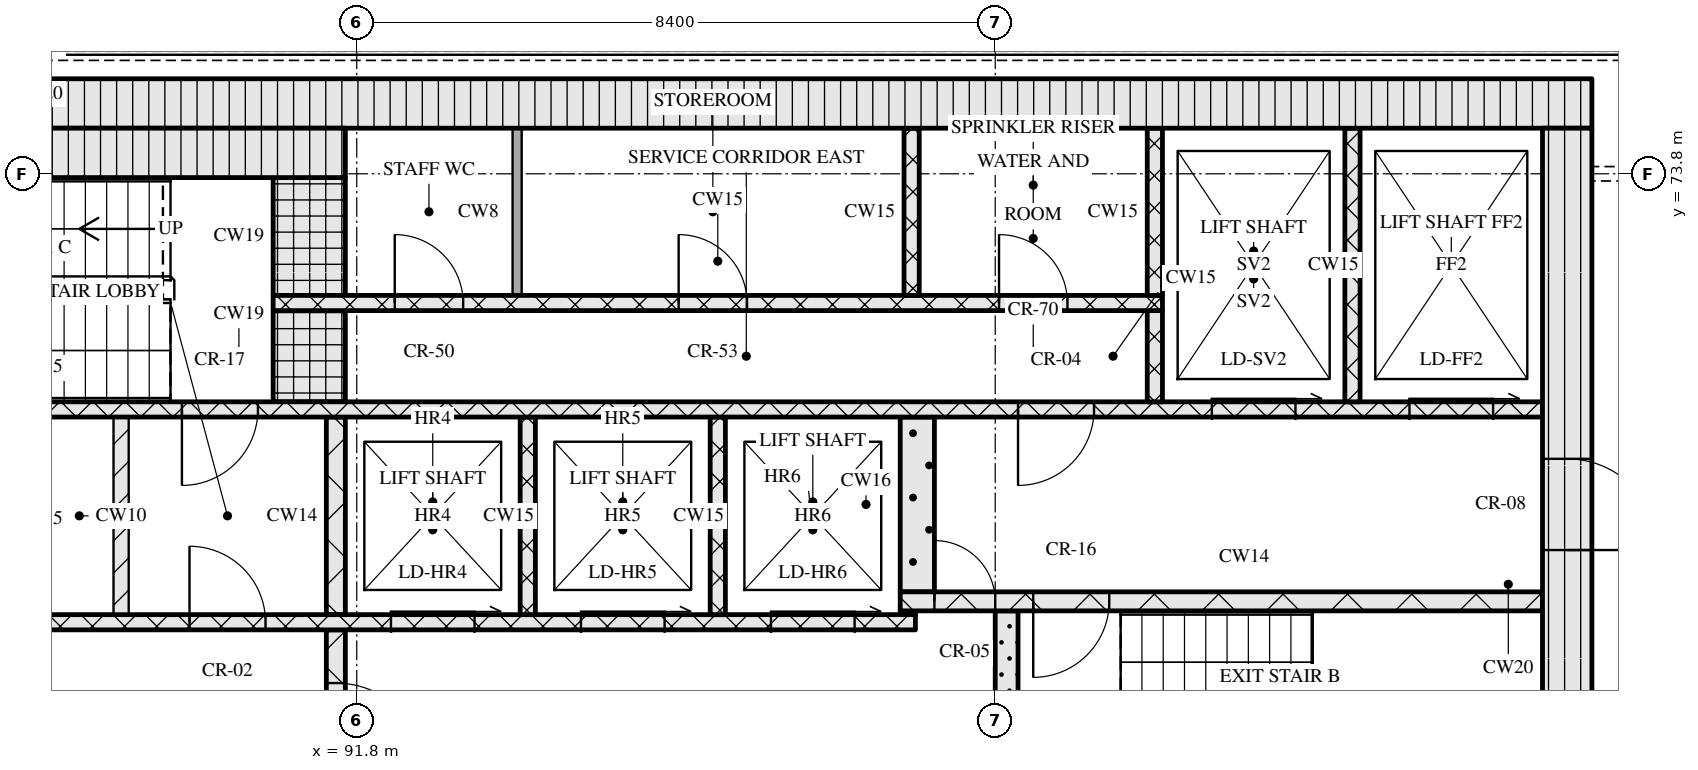
"""IFC4 building model, lengths in metres.
Left out: names, types, materials, properties, quantities, classifications, styles, units other than length and angle.
Written with IfcOpenShell. Run it as: python <this file> out.ifc"""

import sys

from ifc_helpers import new_model, si_unit, direction, frame, frame_2d, origin, place, context, subcontext, project, spatial, rectangle, extrude, element, fill, save


model = new_model("IFC4")
c1 = context("Model", 3, precision=1e-05, world=origin(), true_north=direction((0.0, 1.0)))
c2 = subcontext(c1, "Body", "Model", "MODEL_VIEW")
j1 = project(units=[si_unit("LENGTHUNIT", "METRE"), si_unit("PLANEANGLEUNIT", "RADIAN")], contexts=[c1])
p1 = place(None, origin())
s1 = spatial("IfcSite", under=j1, at=p1, CompositionType="ELEMENT")
p2 = place(p1, origin())
s2 = spatial("IfcBuilding", under=s1, at=p2, CompositionType="ELEMENT")
p3 = place(p2, frame((0.0, 0.0, 219.9)))
s3 = spatial("IfcBuildingStorey", under=s2, at=p3, CompositionType="ELEMENT", Elevation=219.9)
p4 = place(p3, frame((67.15, 74.725, 0.0), z_axis=(0.0, 0.0, 1.0), x_axis=(1.0, 0.0, 0.0)))
e1 = element("IfcWall", 1, at=p4, inside=s3, PredefinedType="SOLIDWALL", context=c2, shape_type="SweptSolid", body=[
    extrude(rectangle(XDim=40.9, YDim=0.65, at=frame_2d((20.45, 0.0))), origin(), (0.0, 0.0, 1.0), 3.32),
])
p5 = place(p3, frame((107.725, 62.4, 0.0), z_axis=(0.0, 0.0, 1.0), x_axis=(0.0, 1.0, 0.0)))
e2 = element("IfcWall", 2, at=p5, inside=s3, PredefinedType="SOLIDWALL", context=c2, shape_type="SweptSolid", body=[
    extrude(rectangle(XDim=12.0, YDim=0.65, at=frame_2d((6.0, 0.0))), origin(), (0.0, 0.0, 1.0), 3.32),
])
p6 = place(p5, frame((6.45, 0.0, 0.0)))
e3 = element("IfcOpeningElement", 3, at=p6, cuts=e2, PredefinedType="OPENING", context=c2, shape_type="SweptSolid", body=[
    extrude(rectangle(XDim=1.2, YDim=2.1, at=frame_2d((0.6, 1.05))), frame((0.0, 0.335, 0.0), z_axis=(0.0, -1.0, 0.0), x_axis=(1.0, 0.0, 0.0)), (0.0, 0.0, 1.0), 0.67),
])
p7 = place(p3, frame((91.525, 65.2, 0.0), z_axis=(0.0, 0.0, 1.0), x_axis=(0.0, 1.0, 0.0)))
e4 = element("IfcWall", 4, at=p7, inside=s3, PredefinedType="SOLIDWALL", context=c2, shape_type="SweptSolid", body=[
    extrude(rectangle(XDim=2.6, YDim=0.25, at=frame_2d((1.3, 0.0))), origin(), (0.0, 0.0, 1.0), 3.32),
])
p8 = place(p7, frame((0.7, 0.0, 0.0)))
e5 = element("IfcOpeningElement", 5, at=p8, cuts=e4, PredefinedType="OPENING", context=c2, shape_type="SweptSolid", body=[
    extrude(rectangle(XDim=1.2, YDim=2.1, at=frame_2d((0.6, 1.05))), frame((0.0, 0.135, 0.0), z_axis=(0.0, -1.0, 0.0), x_axis=(1.0, 0.0, 0.0)), (0.0, 0.0, 1.0), 0.27),
])
p9 = place(p3, frame((100.35, 65.2, 0.0), z_axis=(0.0, 0.0, 1.0), x_axis=(0.0, 1.0, 0.0)))
e6 = element("IfcWall", 6, at=p9, inside=s3, PredefinedType="SOLIDWALL", context=c2, shape_type="SweptSolid", body=[
    extrude(rectangle(XDim=2.85, YDim=0.3, at=frame_2d((1.425, 0.0))), origin(), (0.0, 0.0, 1.0), 3.32),
])
p10 = place(p3, frame((76.05, 67.9, 0.0), z_axis=(0.0, 0.0, 1.0), x_axis=(1.0, 0.0, 0.0)))
e7 = element("IfcWall", 7, at=p10, inside=s3, PredefinedType="SOLIDWALL", context=c2, shape_type="SweptSolid", body=[
    extrude(rectangle(XDim=23.1, YDim=0.2, at=frame_2d((11.55, 0.0))), origin(), (0.0, 0.0, 1.0), 3.32),
])
p11 = place(p10, frame((3.2, 0.0, 0.0)))
e8 = element("IfcOpeningElement", 8, at=p11, cuts=e7, PredefinedType="OPENING", context=c2, shape_type="SweptSolid", body=[
    extrude(rectangle(XDim=0.9, YDim=2.1, at=frame_2d((0.45, 1.05))), frame((0.0, 0.11, 0.0), z_axis=(0.0, -1.0, 0.0), x_axis=(1.0, 0.0, 0.0)), (0.0, 0.0, 1.0), 0.22),
])
p12 = place(p10, frame((9.7, 0.0, 0.0)))
e9 = element("IfcOpeningElement", 9, at=p12, cuts=e7, PredefinedType="OPENING", context=c2, shape_type="SweptSolid", body=[
    extrude(rectangle(XDim=0.9, YDim=2.1, at=frame_2d((0.45, 1.05))), frame((0.0, 0.11, 0.0), z_axis=(0.0, -1.0, 0.0), x_axis=(1.0, 0.0, 0.0)), (0.0, 0.0, 1.0), 0.22),
])
p13 = place(p10, frame((13.55, 0.0, 0.0)))
e10 = element("IfcOpeningElement", 10, at=p13, cuts=e7, PredefinedType="OPENING", context=c2, shape_type="SweptSolid", body=[
    extrude(rectangle(XDim=1.0, YDim=2.1, at=frame_2d((0.5, 1.05))), frame((0.0, 0.11, 0.0), z_axis=(0.0, -1.0, 0.0), x_axis=(1.0, 0.0, 0.0)), (0.0, 0.0, 1.0), 0.22),
])
p14 = place(p10, frame((16.2, 0.0, 0.0)))
e11 = element("IfcOpeningElement", 11, at=p14, cuts=e7, PredefinedType="OPENING", context=c2, shape_type="SweptSolid", body=[
    extrude(rectangle(XDim=1.1, YDim=2.1, at=frame_2d((0.55, 1.05))), frame((0.0, 0.11, 0.0), z_axis=(0.0, -1.0, 0.0), x_axis=(1.0, 0.0, 0.0)), (0.0, 0.0, 1.0), 0.22),
])
p15 = place(p10, frame((18.7, 0.0, 0.0)))
e12 = element("IfcOpeningElement", 12, at=p15, cuts=e7, PredefinedType="OPENING", context=c2, shape_type="SweptSolid", body=[
    extrude(rectangle(XDim=1.1, YDim=2.1, at=frame_2d((0.55, 1.05))), frame((0.0, 0.11, 0.0), z_axis=(0.0, -1.0, 0.0), x_axis=(1.0, 0.0, 0.0)), (0.0, 0.0, 1.0), 0.22),
])
p16 = place(p10, frame((21.2, 0.0, 0.0)))
e13 = element("IfcOpeningElement", 13, at=p16, cuts=e7, PredefinedType="OPENING", context=c2, shape_type="SweptSolid", body=[
    extrude(rectangle(XDim=1.1, YDim=2.1, at=frame_2d((0.55, 1.05))), frame((0.0, 0.11, 0.0), z_axis=(0.0, -1.0, 0.0), x_axis=(1.0, 0.0, 0.0)), (0.0, 0.0, 1.0), 0.22),
])
p17 = place(p3, frame((88.7, 68.0, 0.0), z_axis=(0.0, 0.0, 1.0), x_axis=(0.0, 1.0, 0.0)))
e14 = element("IfcWall", 14, at=p17, inside=s3, PredefinedType="PARTITIONING", context=c2, shape_type="SweptSolid", body=[
    extrude(rectangle(XDim=2.6, YDim=0.2, at=frame_2d((1.3, 0.0))), origin(), (0.0, 0.0, 1.0), 3.32),
])
p18 = place(p3, frame((91.525, 68.0, 0.0), z_axis=(0.0, 0.0, 1.0), x_axis=(0.0, 1.0, 0.0)))
e15 = element("IfcWall", 15, at=p18, inside=s3, PredefinedType="SOLIDWALL", context=c2, shape_type="SweptSolid", body=[
    extrude(rectangle(XDim=2.6, YDim=0.25, at=frame_2d((1.3, 0.0))), origin(), (0.0, 0.0, 1.0), 3.32),
])
for number, where, z_axis, x_axis in (
    (16, (94.05, 68.0, 0.0), (0.0, 0.0, 1.0), (0.0, 1.0, 0.0)),
    (17, (96.55, 68.0, 0.0), (0.0, 0.0, 1.0), (0.0, 1.0, 0.0)),
):
    element("IfcWall", number, at=place(p3, frame(where, z_axis=z_axis, x_axis=x_axis)), inside=s3, PredefinedType="SOLIDWALL", context=c2, shape_type="SweptSolid", body=[
        extrude(rectangle(XDim=2.6, YDim=0.2, at=frame_2d((1.3, 0.0))), origin(), (0.0, 0.0, 1.0), 3.32),
    ])
p19 = place(p3, frame((98.95, 68.025, 0.0), z_axis=(0.0, 0.0, 1.0), x_axis=(1.0, 0.0, 0.0)))
e18 = element("IfcWall", 18, at=p19, inside=s3, PredefinedType="SOLIDWALL", context=c2, shape_type="SweptSolid", body=[
    extrude(rectangle(XDim=0.2, YDim=0.05, at=frame_2d((0.1, 0.0))), origin(), (0.0, 0.0, 1.0), 3.32),
])
p20 = place(p3, frame((98.95, 68.175, 0.0), z_axis=(0.0, 0.0, 1.0), x_axis=(1.0, 0.0, 0.0)))
e19 = element("IfcWall", 19, at=p20, inside=s3, PredefinedType="SOLIDWALL", context=c2, shape_type="SweptSolid", body=[
    extrude(rectangle(XDim=8.45, YDim=0.25, at=frame_2d((4.225, 0.0))), origin(), (0.0, 0.0, 1.0), 3.32),
])
p21 = place(p20, frame((0.45, 0.0, 0.0)))
e20 = element("IfcOpeningElement", 20, at=p21, cuts=e19, PredefinedType="OPENING", context=c2, shape_type="SweptSolid", body=[
    extrude(rectangle(XDim=0.8, YDim=2.1, at=frame_2d((0.4, 1.05))), frame((0.0, 0.135, 0.0), z_axis=(0.0, -1.0, 0.0), x_axis=(1.0, 0.0, 0.0)), (0.0, 0.0, 1.0), 0.27),
])
p22 = place(p20, frame((1.75, 0.0, 0.0)))
e21 = element("IfcOpeningElement", 21, at=p22, cuts=e19, PredefinedType="OPENING", context=c2, shape_type="SweptSolid", body=[
    extrude(rectangle(XDim=1.0, YDim=2.1, at=frame_2d((0.5, 1.05))), frame((0.0, 0.135, 0.0), z_axis=(0.0, -1.0, 0.0), x_axis=(1.0, 0.0, 0.0)), (0.0, 0.0, 1.0), 0.27),
])
p23 = place(p3, frame((99.175, 68.3, 0.0), z_axis=(0.0, 0.0, 1.0), x_axis=(0.0, 1.0, 0.0)))
e22 = element("IfcWall", 22, at=p23, inside=s3, PredefinedType="SOLIDWALL", context=c2, shape_type="SweptSolid", body=[
    extrude(rectangle(XDim=2.3, YDim=0.45, at=frame_2d((1.15, 0.0))), origin(), (0.0, 0.0, 1.0), 3.32),
])
p24 = place(p3, frame((67.8, 70.7, 0.0), z_axis=(0.0, 0.0, 1.0), x_axis=(1.0, 0.0, 0.0)))
e23 = element("IfcWall", 23, at=p24, inside=s3, PredefinedType="SOLIDWALL", context=c2, shape_type="SweptSolid", body=[
    extrude(rectangle(XDim=39.6, YDim=0.2, at=frame_2d((19.8, 0.0))), origin(), (0.0, 0.0, 1.0), 3.32),
])
p25 = place(p24, frame((0.65, 0.0, 0.0)))
e24 = element("IfcOpeningElement", 24, at=p25, cuts=e23, PredefinedType="OPENING", context=c2, shape_type="SweptSolid", body=[
    extrude(rectangle(XDim=1.1, YDim=2.1, at=frame_2d((0.55, 1.05))), frame((0.0, 0.11, 0.0), z_axis=(0.0, -1.0, 0.0), x_axis=(1.0, 0.0, 0.0)), (0.0, 0.0, 1.0), 0.22),
])
p26 = place(p24, frame((3.25, 0.0, 0.0)))
e25 = element("IfcOpeningElement", 25, at=p26, cuts=e23, PredefinedType="OPENING", context=c2, shape_type="SweptSolid", body=[
    extrude(rectangle(XDim=1.1, YDim=2.1, at=frame_2d((0.55, 1.05))), frame((0.0, 0.11, 0.0), z_axis=(0.0, -1.0, 0.0), x_axis=(1.0, 0.0, 0.0)), (0.0, 0.0, 1.0), 0.22),
])
p27 = place(p24, frame((5.9, 0.0, 0.0)))
e26 = element("IfcOpeningElement", 26, at=p27, cuts=e23, PredefinedType="OPENING", context=c2, shape_type="SweptSolid", body=[
    extrude(rectangle(XDim=1.0, YDim=2.1, at=frame_2d((0.5, 1.05))), frame((0.0, 0.11, 0.0), z_axis=(0.0, -1.0, 0.0), x_axis=(1.0, 0.0, 0.0)), (0.0, 0.0, 1.0), 0.22),
])
p28 = place(p24, frame((21.7, 0.0, 0.0)))
e27 = element("IfcOpeningElement", 27, at=p28, cuts=e23, PredefinedType="OPENING", context=c2, shape_type="SweptSolid", body=[
    extrude(rectangle(XDim=1.0, YDim=2.1, at=frame_2d((0.5, 1.05))), frame((0.0, 0.11, 0.0), z_axis=(0.0, -1.0, 0.0), x_axis=(1.0, 0.0, 0.0)), (0.0, 0.0, 1.0), 0.22),
])
p29 = place(p24, frame((32.7, 0.0, 0.0)))
e28 = element("IfcOpeningElement", 28, at=p29, cuts=e23, PredefinedType="OPENING", context=c2, shape_type="SweptSolid", body=[
    extrude(rectangle(XDim=1.0, YDim=2.1, at=frame_2d((0.5, 1.05))), frame((0.0, 0.11, 0.0), z_axis=(0.0, -1.0, 0.0), x_axis=(1.0, 0.0, 0.0)), (0.0, 0.0, 1.0), 0.22),
])
p30 = place(p24, frame((35.25, 0.0, 0.0)))
e29 = element("IfcOpeningElement", 29, at=p30, cuts=e23, PredefinedType="OPENING", context=c2, shape_type="SweptSolid", body=[
    extrude(rectangle(XDim=1.1, YDim=2.1, at=frame_2d((0.55, 1.05))), frame((0.0, 0.11, 0.0), z_axis=(0.0, -1.0, 0.0), x_axis=(1.0, 0.0, 0.0)), (0.0, 0.0, 1.0), 0.22),
])
p31 = place(p24, frame((37.85, 0.0, 0.0)))
e30 = element("IfcOpeningElement", 30, at=p31, cuts=e23, PredefinedType="OPENING", context=c2, shape_type="SweptSolid", body=[
    extrude(rectangle(XDim=1.1, YDim=2.1, at=frame_2d((0.55, 1.05))), frame((0.0, 0.11, 0.0), z_axis=(0.0, -1.0, 0.0), x_axis=(1.0, 0.0, 0.0)), (0.0, 0.0, 1.0), 0.22),
])
p32 = place(p3, frame((91.175, 70.8, 0.0), z_axis=(0.0, 0.0, 1.0), x_axis=(0.0, 1.0, 0.0)))
e31 = element("IfcWall", 31, at=p32, inside=s3, PredefinedType="SOLIDWALL", context=c2, shape_type="SweptSolid", body=[
    extrude(rectangle(XDim=1.2, YDim=0.95, at=frame_2d((0.6, 0.0))), origin(), (0.0, 0.0, 1.0), 3.32),
])
p33 = place(p3, frame((102.3, 70.8, 0.0), z_axis=(0.0, 0.0, 1.0), x_axis=(0.0, 1.0, 0.0)))
e32 = element("IfcWall", 32, at=p33, inside=s3, PredefinedType="SOLIDWALL", context=c2, shape_type="SweptSolid", body=[
    extrude(rectangle(XDim=1.2, YDim=0.2, at=frame_2d((0.6, 0.0))), origin(), (0.0, 0.0, 1.0), 3.32),
])
p34 = place(p3, frame((104.9, 70.8, 0.0), z_axis=(0.0, 0.0, 1.0), x_axis=(0.0, 1.0, 0.0)))
e33 = element("IfcWall", 33, at=p34, inside=s3, PredefinedType="SOLIDWALL", context=c2, shape_type="SweptSolid", body=[
    extrude(rectangle(XDim=3.6, YDim=0.2, at=frame_2d((1.8, 0.0))), origin(), (0.0, 0.0, 1.0), 3.32),
])
p35 = place(p3, frame((90.7, 72.1, 0.0), z_axis=(0.0, 0.0, 1.0), x_axis=(1.0, 0.0, 0.0)))
e34 = element("IfcWall", 34, at=p35, inside=s3, PredefinedType="SOLIDWALL", context=c2, shape_type="SweptSolid", body=[
    extrude(rectangle(XDim=11.7, YDim=0.2, at=frame_2d((5.85, 0.0))), origin(), (0.0, 0.0, 1.0), 3.32),
])
p36 = place(p35, frame((1.6, 0.0, 0.0)))
e35 = element("IfcOpeningElement", 35, at=p36, cuts=e34, PredefinedType="OPENING", context=c2, shape_type="SweptSolid", body=[
    extrude(rectangle(XDim=0.9, YDim=2.1, at=frame_2d((0.45, 1.05))), frame((0.0, 0.11, 0.0), z_axis=(0.0, -1.0, 0.0), x_axis=(1.0, 0.0, 0.0)), (0.0, 0.0, 1.0), 0.22),
])
p37 = place(p35, frame((5.335, 0.0, 0.0)))
e36 = element("IfcOpeningElement", 36, at=p37, cuts=e34, PredefinedType="OPENING", context=c2, shape_type="SweptSolid", body=[
    extrude(rectangle(XDim=0.9, YDim=2.1, at=frame_2d((0.45, 1.05))), frame((0.0, 0.11, 0.0), z_axis=(0.0, -1.0, 0.0), x_axis=(1.0, 0.0, 0.0)), (0.0, 0.0, 1.0), 0.22),
])
p38 = place(p35, frame((9.55, 0.0, 0.0)))
e37 = element("IfcOpeningElement", 37, at=p38, cuts=e34, PredefinedType="OPENING", context=c2, shape_type="SweptSolid", body=[
    extrude(rectangle(XDim=0.9, YDim=2.1, at=frame_2d((0.45, 1.05))), frame((0.0, 0.11, 0.0), z_axis=(0.0, -1.0, 0.0), x_axis=(1.0, 0.0, 0.0)), (0.0, 0.0, 1.0), 0.22),
])
p39 = place(p3, frame((91.175, 72.2, 0.0), z_axis=(0.0, 0.0, 1.0), x_axis=(0.0, 1.0, 0.0)))
e38 = element("IfcWall", 38, at=p39, inside=s3, PredefinedType="SOLIDWALL", context=c2, shape_type="SweptSolid", body=[
    extrude(rectangle(XDim=1.55, YDim=0.95, at=frame_2d((0.775, 0.0))), origin(), (0.0, 0.0, 1.0), 3.32),
])
p40 = place(p3, frame((93.91, 72.2, 0.0), z_axis=(0.0, 0.0, 1.0), x_axis=(0.0, 1.0, 0.0)))
e39 = element("IfcWall", 39, at=p40, inside=s3, PredefinedType="PARTITIONING", context=c2, shape_type="SweptSolid", body=[
    extrude(rectangle(XDim=2.2, YDim=0.12, at=frame_2d((1.1, 0.0))), origin(), (0.0, 0.0, 1.0), 3.32),
])
for number, where, z_axis, x_axis in (
    (40, (99.1, 72.2, 0.0), (0.0, 0.0, 1.0), (0.0, 1.0, 0.0)),
    (41, (102.3, 72.2, 0.0), (0.0, 0.0, 1.0), (0.0, 1.0, 0.0)),
):
    element("IfcWall", number, at=place(p3, frame(where, z_axis=z_axis, x_axis=x_axis)), inside=s3, PredefinedType="SOLIDWALL", context=c2, shape_type="SweptSolid", body=[
        extrude(rectangle(XDim=2.2, YDim=0.2, at=frame_2d((1.1, 0.0))), origin(), (0.0, 0.0, 1.0), 3.32),
    ])
p41 = place(p3, frame((83.55, 74.075, 0.0), z_axis=(0.0, 0.0, 1.0), x_axis=(1.0, 0.0, 0.0)))
e42 = element("IfcWall", 42, at=p41, inside=s3, PredefinedType="SOLIDWALL", context=c2, shape_type="SweptSolid", body=[
    extrude(rectangle(XDim=8.1, YDim=0.65, at=frame_2d((4.05, 0.0))), origin(), (0.0, 0.0, 1.0), 3.32),
])
p42 = place(p8, origin())
e43 = element("IfcDoor", 43, at=p42, inside=s3, OperationType="SINGLE_SWING_RIGHT", PredefinedType="DOOR", context=c2, shape_type="SweptSolid", body=[
    extrude(rectangle(XDim=1.2, YDim=2.1, at=frame_2d((0.6, 1.05))), frame((0.0, 0.025, 0.0), z_axis=(0.0, -1.0, 0.0), x_axis=(1.0, 0.0, 0.0)), (0.0, 0.0, 1.0), 0.05),
])
fill(e5, e43)
p43 = place(p13, origin())
e44 = element("IfcDoor", 44, at=p43, inside=s3, OperationType="SINGLE_SWING_LEFT", PredefinedType="DOOR", context=c2, shape_type="SweptSolid", body=[
    extrude(rectangle(XDim=1.0, YDim=2.1, at=frame_2d((0.5, 1.05))), frame((0.0, 0.025, 0.0), z_axis=(0.0, -1.0, 0.0), x_axis=(1.0, 0.0, 0.0)), (0.0, 0.0, 1.0), 0.05),
])
fill(e10, e44)
p44 = place(p14, origin())
e45 = element("IfcDoor", 45, at=p44, inside=s3, OperationType="SLIDING_TO_RIGHT", PredefinedType="DOOR", context=c2, shape_type="SweptSolid", body=[
    extrude(rectangle(XDim=1.1, YDim=2.1, at=frame_2d((0.55, 1.05))), frame((0.0, 0.025, 0.0), z_axis=(0.0, -1.0, 0.0), x_axis=(1.0, 0.0, 0.0)), (0.0, 0.0, 1.0), 0.05),
])
fill(e11, e45)
p45 = place(p15, origin())
e46 = element("IfcDoor", 46, at=p45, inside=s3, OperationType="SLIDING_TO_RIGHT", PredefinedType="DOOR", context=c2, shape_type="SweptSolid", body=[
    extrude(rectangle(XDim=1.1, YDim=2.1, at=frame_2d((0.55, 1.05))), frame((0.0, 0.025, 0.0), z_axis=(0.0, -1.0, 0.0), x_axis=(1.0, 0.0, 0.0)), (0.0, 0.0, 1.0), 0.05),
])
fill(e12, e46)
p46 = place(p16, origin())
e47 = element("IfcDoor", 47, at=p46, inside=s3, OperationType="SLIDING_TO_RIGHT", PredefinedType="DOOR", context=c2, shape_type="SweptSolid", body=[
    extrude(rectangle(XDim=1.1, YDim=2.1, at=frame_2d((0.55, 1.05))), frame((0.0, 0.025, 0.0), z_axis=(0.0, -1.0, 0.0), x_axis=(1.0, 0.0, 0.0)), (0.0, 0.0, 1.0), 0.05),
])
fill(e13, e47)
p47 = place(p21, origin())
e48 = element("IfcDoor", 48, at=p47, inside=s3, OperationType="SINGLE_SWING_LEFT", PredefinedType="DOOR", context=c2, shape_type="SweptSolid", body=[
    extrude(rectangle(XDim=0.8, YDim=2.1, at=frame_2d((0.4, 1.05))), frame((0.0, 0.025, 0.0), z_axis=(0.0, -1.0, 0.0), x_axis=(1.0, 0.0, 0.0)), (0.0, 0.0, 1.0), 0.05),
])
fill(e20, e48)
p48 = place(p22, origin())
e49 = element("IfcDoor", 49, at=p48, inside=s3, OperationType="SINGLE_SWING_RIGHT", PredefinedType="DOOR", context=c2, shape_type="SweptSolid", body=[
    extrude(rectangle(XDim=1.0, YDim=2.1, at=frame_2d((0.5, 1.05))), frame((0.0, 0.025, 0.0), z_axis=(0.0, -1.0, 0.0), x_axis=(1.0, 0.0, 0.0)), (0.0, 0.0, 1.0), 0.05),
])
fill(e21, e49)
p49 = place(p6, origin())
e50 = element("IfcDoor", 50, at=p49, inside=s3, OperationType="SINGLE_SWING_RIGHT", PredefinedType="DOOR", context=c2, shape_type="SweptSolid", body=[
    extrude(rectangle(XDim=1.2, YDim=2.1, at=frame_2d((0.6, 1.05))), frame((0.0, 0.025, 0.0), z_axis=(0.0, -1.0, 0.0), x_axis=(1.0, 0.0, 0.0)), (0.0, 0.0, 1.0), 0.05),
])
fill(e3, e50)
p50 = place(p28, origin())
e51 = element("IfcDoor", 51, at=p50, inside=s3, OperationType="SINGLE_SWING_RIGHT", PredefinedType="DOOR", context=c2, shape_type="SweptSolid", body=[
    extrude(rectangle(XDim=1.0, YDim=2.1, at=frame_2d((0.5, 1.05))), frame((0.0, 0.025, 0.0), z_axis=(0.0, -1.0, 0.0), x_axis=(1.0, 0.0, 0.0)), (0.0, 0.0, 1.0), 0.05),
])
fill(e27, e51)
p51 = place(p29, origin())
e52 = element("IfcDoor", 52, at=p51, inside=s3, OperationType="SINGLE_SWING_RIGHT", PredefinedType="DOOR", context=c2, shape_type="SweptSolid", body=[
    extrude(rectangle(XDim=1.0, YDim=2.1, at=frame_2d((0.5, 1.05))), frame((0.0, 0.025, 0.0), z_axis=(0.0, -1.0, 0.0), x_axis=(1.0, 0.0, 0.0)), (0.0, 0.0, 1.0), 0.05),
])
fill(e28, e52)
p52 = place(p30, origin())
e53 = element("IfcDoor", 53, at=p52, inside=s3, OperationType="SLIDING_TO_RIGHT", PredefinedType="DOOR", context=c2, shape_type="SweptSolid", body=[
    extrude(rectangle(XDim=1.1, YDim=2.1, at=frame_2d((0.55, 1.05))), frame((0.0, 0.025, 0.0), z_axis=(0.0, -1.0, 0.0), x_axis=(1.0, 0.0, 0.0)), (0.0, 0.0, 1.0), 0.05),
])
fill(e29, e53)
p53 = place(p31, origin())
e54 = element("IfcDoor", 54, at=p53, inside=s3, OperationType="SLIDING_TO_RIGHT", PredefinedType="DOOR", context=c2, shape_type="SweptSolid", body=[
    extrude(rectangle(XDim=1.1, YDim=2.1, at=frame_2d((0.55, 1.05))), frame((0.0, 0.025, 0.0), z_axis=(0.0, -1.0, 0.0), x_axis=(1.0, 0.0, 0.0)), (0.0, 0.0, 1.0), 0.05),
])
fill(e30, e54)
p54 = place(p36, origin())
e55 = element("IfcDoor", 55, at=p54, inside=s3, OperationType="SINGLE_SWING_LEFT", PredefinedType="DOOR", context=c2, shape_type="SweptSolid", body=[
    extrude(rectangle(XDim=0.9, YDim=2.1, at=frame_2d((0.45, 1.05))), frame((0.0, 0.025, 0.0), z_axis=(0.0, -1.0, 0.0), x_axis=(1.0, 0.0, 0.0)), (0.0, 0.0, 1.0), 0.05),
])
fill(e35, e55)
p55 = place(p37, origin())
e56 = element("IfcDoor", 56, at=p55, inside=s3, OperationType="SINGLE_SWING_LEFT", PredefinedType="DOOR", context=c2, shape_type="SweptSolid", body=[
    extrude(rectangle(XDim=0.9, YDim=2.1, at=frame_2d((0.45, 1.05))), frame((0.0, 0.025, 0.0), z_axis=(0.0, -1.0, 0.0), x_axis=(1.0, 0.0, 0.0)), (0.0, 0.0, 1.0), 0.05),
])
fill(e36, e56)
p56 = place(p38, origin())
e57 = element("IfcDoor", 57, at=p56, inside=s3, OperationType="SINGLE_SWING_LEFT", PredefinedType="DOOR", context=c2, shape_type="SweptSolid", body=[
    extrude(rectangle(XDim=0.9, YDim=2.1, at=frame_2d((0.45, 1.05))), frame((0.0, 0.025, 0.0), z_axis=(0.0, -1.0, 0.0), x_axis=(1.0, 0.0, 0.0)), (0.0, 0.0, 1.0), 0.05),
])
fill(e37, e57)
save(model, sys.argv[1])
